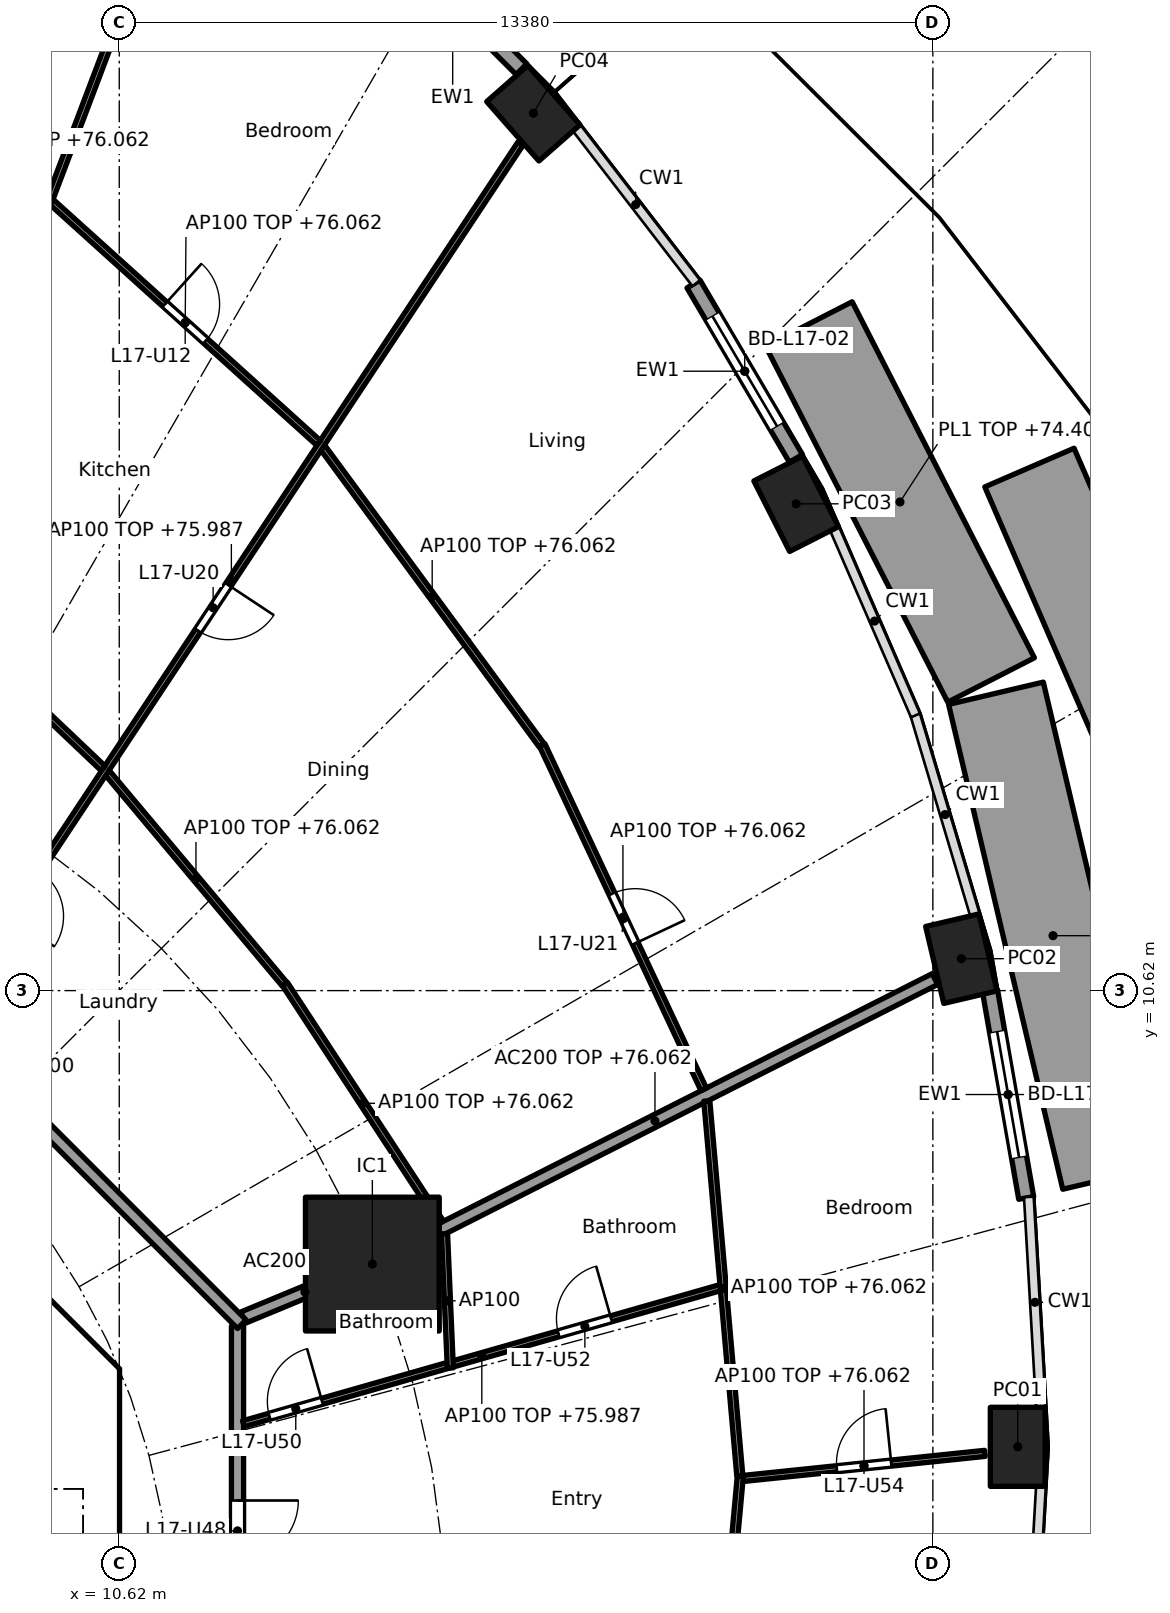
"""IFC4 building model, lengths in metres.
Left out: names, types, materials, properties, quantities, classifications, styles, units other than length and angle.
Written with IfcOpenShell. Run it as: python <this file> out.ifc"""

import sys

from ifc_helpers import new_model, si_unit, direction, frame, frame_2d, origin, origin_2d, place, context, subcontext, project, spatial, polyline, rectangle, hollow_rectangle, outline, extrude, element, fill, save


model = new_model("IFC4")
c1 = context("Model", 3, precision=1e-05, world=origin(), true_north=direction((0.0, 1.0)))
c2 = subcontext(c1, "Body", "Model", "MODEL_VIEW")
j1 = project(units=[si_unit("LENGTHUNIT", "METRE"), si_unit("PLANEANGLEUNIT", "RADIAN")], contexts=[c1])
p1 = place(None, origin())
s1 = spatial("IfcSite", under=j1, at=p1, CompositionType="ELEMENT")
p2 = place(p1, origin())
s2 = spatial("IfcBuilding", under=s1, at=p2, CompositionType="ELEMENT")
p3 = place(p2, frame((0.0, 0.0, 73.3)))
s3 = spatial("IfcBuildingStorey", under=s2, at=p3, CompositionType="ELEMENT", Elevation=73.3)
for number, where, z_axis, x_axis in (
    (1, (25.395, 3.118, -0.26), (0.0, 0.0, 1.0), (0.0, 1.0, 0.0)),
    (2, (24.468, 11.145, -0.26), (0.0, 0.0, 1.0), (-0.229, 0.973, 0.0)),
    (3, (21.751, 18.625, -0.26), (0.0, 0.0, 1.0), (-0.452, 0.892, 0.0)),
    (4, (17.43, 25.049, -0.26), (0.0, 0.0, 1.0), (-0.66, 0.751, 0.0)),
):
    element("IfcColumn", number, at=place(p3, frame(where, z_axis=z_axis, x_axis=x_axis)), inside=s3, PredefinedType="COLUMN", context=c2, shape_type="SweptSolid", body=[
        extrude(hollow_rectangle(XDim=1.3, YDim=0.9, WallThickness=0.045, at=origin_2d()), origin(), (0.0, 0.0, 1.0), 3.96),
    ])
p4 = place(p3, frame((14.782, 6.123, 0.0), z_axis=(0.0, 0.0, 1.0), x_axis=(1.0, 0.0, 0.0)))
e5 = element("IfcColumn", 5, at=p4, inside=s3, PredefinedType="COLUMN", context=c2, shape_type="SweptSolid", body=[
    extrude(rectangle(XDim=2.2, YDim=2.2, at=origin_2d()), origin(), (0.0, 0.0, 1.0), 3.7),
])
p5 = place(p3, frame((24.94, 10.613, 0.0), z_axis=(0.0, 0.0, 1.0), x_axis=(0.172164316671, -0.985068245385, 0.0)))
e6 = element("IfcWall", 6, at=p5, inside=s3, PredefinedType="SOLIDWALL", context=c2, shape_type="SweptSolid", body=[
    extrude(rectangle(XDim=3.454, YDim=0.25, at=frame_2d((1.727, 0.0))), origin(), (0.0, 0.0, 1.0), 3.44),
])
p6 = place(p5, frame((0.677, 0.0, 0.0)))
e7 = element("IfcOpeningElement", 7, at=p6, cuts=e6, PredefinedType="OPENING", context=c2, shape_type="SweptSolid", body=[
    extrude(rectangle(XDim=2.1, YDim=2.4, at=frame_2d((1.05, 1.2))), frame((0.0, 0.135, 0.0), z_axis=(0.0, -1.0, 0.0), x_axis=(1.0, 0.0, 0.0)), (0.0, 0.0, 1.0), 0.27),
])
p7 = place(p3, frame((20.064, 22.24, 0.0), z_axis=(0.0, 0.0, 1.0), x_axis=(0.506297921217, -0.862358634775, 0.0)))
e8 = element("IfcWall", 8, at=p7, inside=s3, PredefinedType="SOLIDWALL", context=c2, shape_type="SweptSolid", body=[
    extrude(rectangle(XDim=3.325, YDim=0.25, at=frame_2d((1.662, 0.0))), origin(), (0.0, 0.0, 1.0), 3.44),
])
p8 = place(p7, frame((0.612, 0.0, 0.0)))
e9 = element("IfcOpeningElement", 9, at=p8, cuts=e8, PredefinedType="OPENING", context=c2, shape_type="SweptSolid", body=[
    extrude(rectangle(XDim=2.1, YDim=2.4, at=frame_2d((1.05, 1.2))), frame((0.0, 0.135, 0.0), z_axis=(0.0, -1.0, 0.0), x_axis=(1.0, 0.0, 0.0)), (0.0, 0.0, 1.0), 0.27),
])
p9 = place(p3, frame((14.971, 28.032, 0.0), z_axis=(0.0, 0.0, 1.0), x_axis=(0.707793551437, -0.706419343269, 0.0)))
e10 = element("IfcWall", 10, at=p9, inside=s3, PredefinedType="SOLIDWALL", context=c2, shape_type="SweptSolid", body=[
    extrude(rectangle(XDim=3.198, YDim=0.25, at=frame_2d((1.599, 0.0))), origin(), (0.0, 0.0, 1.0), 3.44),
])
p10 = place(p9, frame((0.549, 0.0, 0.0)))
e11 = element("IfcOpeningElement", 11, at=p10, cuts=e10, PredefinedType="OPENING", context=c2, shape_type="SweptSolid", body=[
    extrude(rectangle(XDim=2.1, YDim=2.4, at=frame_2d((1.05, 1.2))), frame((0.0, 0.135, 0.0), z_axis=(0.0, -1.0, 0.0), x_axis=(1.0, 0.0, 0.0)), (0.0, 0.0, 1.0), 0.27),
])
p11 = place(p3, frame((24.957, 15.728, 0.0), z_axis=(0.0, 0.0, 1.0), x_axis=(-0.45556816318, 0.890200903559, 0.0)))
e12 = element("IfcWall", 12, at=p11, inside=s3, PredefinedType="SOLIDWALL", context=c2, shape_type="SweptSolid", body=[
    extrude(rectangle(XDim=6.577, YDim=1.6, at=frame_2d((3.289, 0.0))), origin(), (0.0, 0.0, 1.0), 1.1),
])
p12 = place(p3, frame((25.588, 19.221, 0.0), z_axis=(0.0, 0.0, 1.0), x_axis=(0.397526330852, -0.917590767325, 0.0)))
e13 = element("IfcWall", 13, at=p12, inside=s3, PredefinedType="SOLIDWALL", context=c2, shape_type="SweptSolid", body=[
    extrude(rectangle(XDim=11.827, YDim=1.6, at=frame_2d((5.913, 0.0))), origin(), (0.0, 0.0, 1.0), 1.1),
])
p13 = place(p3, frame((26.915, 7.537, 0.0), z_axis=(0.0, 0.0, 1.0), x_axis=(-0.229208785171, 0.973377281839, 0.0)))
e14 = element("IfcWall", 14, at=p13, inside=s3, PredefinedType="SOLIDWALL", context=c2, shape_type="SweptSolid", body=[
    extrude(rectangle(XDim=8.191, YDim=1.6, at=frame_2d((4.095, 0.0))), origin(), (0.0, 0.0, 1.0), 1.1),
])
p14 = place(p3, frame((9.988, 4.613, 0.0), z_axis=(0.0, 0.0, 1.0), x_axis=(-0.707106781187, 0.707106781187, 0.0)))
e15 = element("IfcWall", 15, at=p14, inside=s3, PredefinedType="SHEAR", context=c2, shape_type="SweptSolid", body=[
    extrude(rectangle(XDim=7.602, YDim=0.6, at=frame_2d((3.801, 0.0))), origin(), (0.0, 0.0, 1.0), 3.44),
])
p15 = place(p14, frame((3.201, 0.0, 0.0)))
e16 = element("IfcOpeningElement", 16, at=p15, cuts=e15, PredefinedType="OPENING", context=c2, shape_type="SweptSolid", body=[
    extrude(rectangle(XDim=1.2, YDim=2.1, at=frame_2d((0.6, 1.05))), frame((0.0, 0.31, 0.0), z_axis=(0.0, -1.0, 0.0), x_axis=(1.0, 0.0, 0.0)), (0.0, 0.0, 1.0), 0.62),
])
p16 = place(p3, frame((6.7, 4.0, 0.0), z_axis=(0.0, 0.0, 1.0), x_axis=(1.0, 0.0, 0.0)))
e17 = element("IfcWall", 17, at=p16, inside=s3, PredefinedType="SOLIDWALL", context=c2, shape_type="SweptSolid", body=[
    extrude(rectangle(XDim=3.325, YDim=0.2, at=frame_2d((1.662, 0.0))), origin(), (0.0, 0.0, 1.0), 3.44),
])
p17 = place(p16, frame((1.25, 0.0, 0.0)))
e18 = element("IfcOpeningElement", 18, at=p17, cuts=e17, PredefinedType="OPENING", context=c2, shape_type="SweptSolid", body=[
    extrude(rectangle(XDim=1.1, YDim=2.1, at=frame_2d((0.55, 1.05))), frame((0.0, 0.11, 0.0), z_axis=(0.0, -1.0, 0.0), x_axis=(1.0, 0.0, 0.0)), (0.0, 0.0, 1.0), 0.22),
])
p18 = place(p3, origin())
e19 = element("IfcWall", 19, at=p18, inside=s3, PredefinedType="SHEAR", context=c2, shape_type="SweptSolid", body=[
    extrude(outline(polyline([(9.776, -4.401), (10.025, -4.152), (10.025, -3.801), (10.025, 4.152), (9.776, 4.401), (10.2, 4.825), (10.625, 4.401), (10.625, -4.401), (10.2, -4.825), (9.776, -4.401)])), origin(), (0.0, 0.0, 1.0), 3.44),
])
p19 = place(p3, frame((12.657, 5.243, 0.0), z_axis=(0.0, 0.0, 1.0), x_axis=(0.923876145736, 0.382691608661, 0.0)))
e20 = element("IfcWall", 20, at=p19, inside=s3, PredefinedType="PARTITIONING", context=c2, shape_type="SweptSolid", body=[
    extrude(rectangle(XDim=2.2, YDim=0.2, at=frame_2d((1.1, 0.0))), origin(), (0.0, 0.0, 1.0), 3.44),
])
p20 = place(p3, frame((14.827, 6.146, 0.0), z_axis=(0.0, 0.0, 1.0), x_axis=(0.892068075337, 0.451901038906, 0.0)))
e21 = element("IfcWall", 21, at=p20, inside=s3, PredefinedType="PARTITIONING", context=c2, shape_type="SweptSolid", body=[
    extrude(rectangle(XDim=10.32, YDim=0.2, at=frame_2d((5.16, 0.0))), origin(), (0.0, 0.0, 1.0), 2.762),
])
p21 = place(p3, frame((12.565, -5.104, 0.0), z_axis=(0.0, 0.0, 1.0), x_axis=(0.0, 1.0, 0.0)))
e22 = element("IfcWall", 22, at=p21, inside=s3, PredefinedType="PARTITIONING", context=c2, shape_type="SweptSolid", body=[
    extrude(rectangle(XDim=10.209, YDim=0.2, at=frame_2d((5.104, 0.0))), origin(), (0.0, 0.0, 1.0), 3.44),
])
p22 = place(p21, frame((6.339, 0.0, 0.0)))
e23 = element("IfcOpeningElement", 23, at=p22, cuts=e22, PredefinedType="OPENING", context=c2, shape_type="SweptSolid", body=[
    extrude(rectangle(XDim=1.0, YDim=2.1, at=frame_2d((0.5, 1.05))), frame((0.0, 0.11, 0.0), z_axis=(0.0, -1.0, 0.0), x_axis=(1.0, 0.0, 0.0)), (0.0, 0.0, 1.0), 0.22),
])
p23 = place(p3, frame((12.635, 5.134, 0.0), z_axis=(0.0, 0.0, 1.0), x_axis=(-0.707106781187, 0.707106781187, 0.0)))
e24 = element("IfcWall", 24, at=p23, inside=s3, PredefinedType="PARTITIONING", context=c2, shape_type="SweptSolid", body=[
    extrude(rectangle(XDim=10.609, YDim=0.2, at=frame_2d((5.305, 0.0))), origin(), (0.0, 0.0, 1.0), 3.44),
])
p24 = place(p3, frame((20.879, 2.597, 0.0), z_axis=(0.0, 0.0, 1.0), x_axis=(0.994666546694, 0.103142914868, 0.0)))
e25 = element("IfcWall", 25, at=p24, inside=s3, PredefinedType="PARTITIONING", context=c2, shape_type="SweptSolid", body=[
    extrude(rectangle(XDim=3.998, YDim=0.1, at=frame_2d((1.999, 0.0))), origin(), (0.0, 0.0, 1.0), 2.762),
])
p25 = place(p24, frame((1.549, 0.0, 0.0)))
e26 = element("IfcOpeningElement", 26, at=p25, cuts=e25, PredefinedType="OPENING", context=c2, shape_type="SweptSolid", body=[
    extrude(rectangle(XDim=0.9, YDim=2.1, at=frame_2d((0.45, 1.05))), frame((0.0, 0.06, 0.0), z_axis=(0.0, -1.0, 0.0), x_axis=(1.0, 0.0, 0.0)), (0.0, 0.0, 1.0), 0.12),
])
p26 = place(p3, frame((20.825, 2.642, 0.0), z_axis=(0.0, 0.0, 1.0), x_axis=(-0.087760219522, 0.996141628419, 0.0)))
e27 = element("IfcWall", 27, at=p26, inside=s3, PredefinedType="PARTITIONING", context=c2, shape_type="SweptSolid", body=[
    extrude(rectangle(XDim=6.187, YDim=0.1, at=frame_2d((3.094, 0.0))), origin(), (0.0, 0.0, 1.0), 2.762),
])
p27 = place(p3, frame((20.834, 2.642, 0.0), z_axis=(0.0, 0.0, 1.0), x_axis=(-0.091385407685, -0.995815599025, 0.0)))
e28 = element("IfcWall", 28, at=p27, inside=s3, PredefinedType="PARTITIONING", context=c2, shape_type="SweptSolid", body=[
    extrude(rectangle(XDim=6.502, YDim=0.1, at=frame_2d((3.251, 0.0))), origin(), (0.0, 0.0, 1.0), 2.762),
])
p28 = place(p27, frame((1.201, 0.0, 0.0)))
e29 = element("IfcOpeningElement", 29, at=p28, cuts=e28, PredefinedType="OPENING", context=c2, shape_type="SweptSolid", body=[
    extrude(rectangle(XDim=0.9, YDim=2.1, at=frame_2d((0.45, 1.05))), frame((0.0, 0.06, 0.0), z_axis=(0.0, -1.0, 0.0), x_axis=(1.0, 0.0, 0.0)), (0.0, 0.0, 1.0), 0.12),
])
p29 = place(p3, frame((12.661, 3.497, 0.0), z_axis=(0.0, 0.0, 1.0), x_axis=(0.961626678623, 0.274361314621, 0.0)))
e30 = element("IfcWall", 30, at=p29, inside=s3, PredefinedType="PARTITIONING", context=c2, shape_type="SweptSolid", body=[
    extrude(rectangle(XDim=8.156, YDim=0.1, at=frame_2d((4.078, 0.0))), origin(), (0.0, 0.0, 1.0), 2.687),
])
p30 = place(p29, frame((0.446, 0.0, 0.0)))
e31 = element("IfcOpeningElement", 31, at=p30, cuts=e30, PredefinedType="OPENING", context=c2, shape_type="SweptSolid", body=[
    extrude(rectangle(XDim=0.9, YDim=2.1, at=frame_2d((0.45, 1.05))), frame((0.0, 0.06, 0.0), z_axis=(0.0, -1.0, 0.0), x_axis=(1.0, 0.0, 0.0)), (0.0, 0.0, 1.0), 0.12),
])
p31 = place(p29, frame((5.39, 0.0, 0.0)))
e32 = element("IfcOpeningElement", 32, at=p31, cuts=e30, PredefinedType="OPENING", context=c2, shape_type="SweptSolid", body=[
    extrude(rectangle(XDim=0.9, YDim=2.1, at=frame_2d((0.45, 1.05))), frame((0.0, 0.06, 0.0), z_axis=(0.0, -1.0, 0.0), x_axis=(1.0, 0.0, 0.0)), (0.0, 0.0, 1.0), 0.12),
])
p32 = place(p3, frame((16.064, 4.415, 0.0), z_axis=(0.0, 0.0, 1.0), x_axis=(-0.043101501373, 0.999070698489, 0.0)))
e33 = element("IfcWall", 33, at=p32, inside=s3, PredefinedType="PARTITIONING", context=c2, shape_type="SweptSolid", body=[
    extrude(rectangle(XDim=2.209, YDim=0.1, at=frame_2d((1.104, 0.0))), origin(), (0.0, 0.0, 1.0), 3.44),
])
p33 = place(p3, frame((15.91, 6.806, 0.0), z_axis=(0.0, 0.0, 1.0), x_axis=(-0.547468243486, 0.836826458936, 0.0)))
e34 = element("IfcWall", 34, at=p33, inside=s3, PredefinedType="PARTITIONING", context=c2, shape_type="SweptSolid", body=[
    extrude(rectangle(XDim=4.688, YDim=0.1, at=frame_2d((2.344, 0.0))), origin(), (0.0, 0.0, 1.0), 2.762),
])
p34 = place(p3, frame((20.231, 8.995, 0.0), z_axis=(0.0, 0.0, 1.0), x_axis=(-0.424587886407, 0.905386727712, 0.0)))
e35 = element("IfcWall", 35, at=p34, inside=s3, PredefinedType="PARTITIONING", context=c2, shape_type="SweptSolid", body=[
    extrude(rectangle(XDim=6.254, YDim=0.1, at=frame_2d((3.127, 0.0))), origin(), (0.0, 0.0, 1.0), 2.762),
])
p35 = place(p34, frame((2.652, 0.0, 0.0)))
e36 = element("IfcOpeningElement", 36, at=p35, cuts=e35, PredefinedType="OPENING", context=c2, shape_type="SweptSolid", body=[
    extrude(rectangle(XDim=0.9, YDim=2.1, at=frame_2d((0.45, 1.05))), frame((0.0, 0.06, 0.0), z_axis=(0.0, -1.0, 0.0), x_axis=(1.0, 0.0, 0.0)), (0.0, 0.0, 1.0), 0.12),
])
p36 = place(p3, frame((13.339, 10.725, 0.0), z_axis=(0.0, 0.0, 1.0), x_axis=(-0.642515455924, 0.766272724882, 0.0)))
e37 = element("IfcWall", 37, at=p36, inside=s3, PredefinedType="PARTITIONING", context=c2, shape_type="SweptSolid", body=[
    extrude(rectangle(XDim=4.537, YDim=0.1, at=frame_2d((2.269, 0.0))), origin(), (0.0, 0.0, 1.0), 2.762),
])
p37 = place(p3, frame((17.567, 14.653, 0.0), z_axis=(0.0, 0.0, 1.0), x_axis=(-0.592391983588, 0.80564988536, 0.0)))
e38 = element("IfcWall", 38, at=p37, inside=s3, PredefinedType="PARTITIONING", context=c2, shape_type="SweptSolid", body=[
    extrude(rectangle(XDim=6.08, YDim=0.1, at=frame_2d((3.04, 0.0))), origin(), (0.0, 0.0, 1.0), 2.762),
])
p38 = place(p3, frame((7.713, 10.195, 0.0), z_axis=(0.0, 0.0, 1.0), x_axis=(0.552111071171, 0.833770571015, 0.0)))
e39 = element("IfcWall", 39, at=p38, inside=s3, PredefinedType="PARTITIONING", context=c2, shape_type="SweptSolid", body=[
    extrude(rectangle(XDim=17.208, YDim=0.1, at=frame_2d((8.604, 0.0))), origin(), (0.0, 0.0, 1.0), 2.687),
])
p39 = place(p38, frame((1.976, 0.0, 0.0)))
e40 = element("IfcOpeningElement", 40, at=p39, cuts=e39, PredefinedType="OPENING", context=c2, shape_type="SweptSolid", body=[
    extrude(rectangle(XDim=0.9, YDim=2.1, at=frame_2d((0.45, 1.05))), frame((0.0, 0.06, 0.0), z_axis=(0.0, -1.0, 0.0), x_axis=(1.0, 0.0, 0.0)), (0.0, 0.0, 1.0), 0.12),
])
p40 = place(p38, frame((7.611, 0.0, 0.0)))
e41 = element("IfcOpeningElement", 41, at=p40, cuts=e39, PredefinedType="OPENING", context=c2, shape_type="SweptSolid", body=[
    extrude(rectangle(XDim=0.9, YDim=2.1, at=frame_2d((0.45, 1.05))), frame((0.0, 0.06, 0.0), z_axis=(0.0, -1.0, 0.0), x_axis=(1.0, 0.0, 0.0)), (0.0, 0.0, 1.0), 0.12),
])
p41 = place(p3, frame((10.355, 14.274, 0.0), z_axis=(0.0, 0.0, 1.0), x_axis=(-0.725219204328, 0.688518050361, 0.0)))
e42 = element("IfcWall", 42, at=p41, inside=s3, PredefinedType="PARTITIONING", context=c2, shape_type="SweptSolid", body=[
    extrude(rectangle(XDim=4.437, YDim=0.1, at=frame_2d((2.219, 0.0))), origin(), (0.0, 0.0, 1.0), 2.762),
])
p42 = place(p3, frame((13.898, 19.625, 0.0), z_axis=(0.0, 0.0, 1.0), x_axis=(-0.742400132046, 0.669956747812, 0.0)))
e43 = element("IfcWall", 43, at=p42, inside=s3, PredefinedType="PARTITIONING", context=c2, shape_type="SweptSolid", body=[
    extrude(rectangle(XDim=5.911, YDim=0.1, at=frame_2d((2.956, 0.0))), origin(), (0.0, 0.0, 1.0), 2.762),
])
p43 = place(p42, frame((2.506, 0.0, 0.0)))
e44 = element("IfcOpeningElement", 44, at=p43, cuts=e43, PredefinedType="OPENING", context=c2, shape_type="SweptSolid", body=[
    extrude(rectangle(XDim=0.9, YDim=2.1, at=frame_2d((0.45, 1.05))), frame((0.0, 0.06, 0.0), z_axis=(0.0, -1.0, 0.0), x_axis=(1.0, 0.0, 0.0)), (0.0, 0.0, 1.0), 0.12),
])
p44 = place(p3, frame((6.141, 14.829, 0.0), z_axis=(0.0, 0.0, 1.0), x_axis=(0.354477134193, 0.935064682968, 0.0)))
e45 = element("IfcWall", 45, at=p44, inside=s3, PredefinedType="PARTITIONING", context=c2, shape_type="SweptSolid", body=[
    extrude(rectangle(XDim=15.626, YDim=0.1, at=frame_2d((7.813, 0.0))), origin(), (0.0, 0.0, 1.0), 2.762),
])
p45 = place(p44, frame((1.35, 0.0, 0.0)))
e46 = element("IfcOpeningElement", 46, at=p45, cuts=e45, PredefinedType="OPENING", context=c2, shape_type="SweptSolid", body=[
    extrude(rectangle(XDim=0.9, YDim=2.1, at=frame_2d((0.45, 1.05))), frame((0.0, 0.06, 0.0), z_axis=(0.0, -1.0, 0.0), x_axis=(1.0, 0.0, 0.0)), (0.0, 0.0, 1.0), 0.12),
])
p46 = place(p44, frame((5.606, 0.0, 0.0)))
e47 = element("IfcOpeningElement", 47, at=p46, cuts=e45, PredefinedType="OPENING", context=c2, shape_type="SweptSolid", body=[
    extrude(rectangle(XDim=0.9, YDim=2.1, at=frame_2d((0.45, 1.05))), frame((0.0, 0.06, 0.0), z_axis=(0.0, -1.0, 0.0), x_axis=(1.0, 0.0, 0.0)), (0.0, 0.0, 1.0), 0.12),
])
p47 = place(p6, origin())
e48 = element("IfcDoor", 48, at=p47, inside=s3, OperationType="SLIDING_TO_LEFT", PredefinedType="DOOR", context=c2, shape_type="SweptSolid", body=[
    extrude(rectangle(XDim=2.1, YDim=2.4, at=frame_2d((1.05, 1.2))), frame((0.0, 0.025, 0.0), z_axis=(0.0, -1.0, 0.0), x_axis=(1.0, 0.0, 0.0)), (0.0, 0.0, 1.0), 0.05),
])
fill(e7, e48)
p48 = place(p8, origin())
e49 = element("IfcDoor", 49, at=p48, inside=s3, OperationType="SLIDING_TO_LEFT", PredefinedType="DOOR", context=c2, shape_type="SweptSolid", body=[
    extrude(rectangle(XDim=2.1, YDim=2.4, at=frame_2d((1.05, 1.2))), frame((0.0, 0.025, 0.0), z_axis=(0.0, -1.0, 0.0), x_axis=(1.0, 0.0, 0.0)), (0.0, 0.0, 1.0), 0.05),
])
fill(e9, e49)
p49 = place(p43, frame((0.9, 0.0, 0.0), x_axis=(-1.0, 0.0, 0.0)))
e50 = element("IfcDoor", 50, at=p49, inside=s3, OperationType="SINGLE_SWING_LEFT", PredefinedType="DOOR", context=c2, shape_type="SweptSolid", body=[
    extrude(rectangle(XDim=0.9, YDim=2.1, at=frame_2d((0.45, 1.05))), frame((0.0, 0.025, 0.0), z_axis=(0.0, -1.0, 0.0), x_axis=(1.0, 0.0, 0.0)), (0.0, 0.0, 1.0), 0.05),
])
fill(e44, e50)
p50 = place(p40, frame((0.9, 0.0, 0.0), x_axis=(-1.0, 0.0, 0.0)))
e51 = element("IfcDoor", 51, at=p50, inside=s3, OperationType="SINGLE_SWING_LEFT", PredefinedType="DOOR", context=c2, shape_type="SweptSolid", body=[
    extrude(rectangle(XDim=0.9, YDim=2.1, at=frame_2d((0.45, 1.05))), frame((0.0, 0.025, 0.0), z_axis=(0.0, -1.0, 0.0), x_axis=(1.0, 0.0, 0.0)), (0.0, 0.0, 1.0), 0.05),
])
fill(e41, e51)
p51 = place(p35, frame((0.9, 0.0, 0.0), x_axis=(-1.0, 0.0, 0.0)))
e52 = element("IfcDoor", 52, at=p51, inside=s3, OperationType="SINGLE_SWING_RIGHT", PredefinedType="DOOR", context=c2, shape_type="SweptSolid", body=[
    extrude(rectangle(XDim=0.9, YDim=2.1, at=frame_2d((0.45, 1.05))), frame((0.0, 0.025, 0.0), z_axis=(0.0, -1.0, 0.0), x_axis=(1.0, 0.0, 0.0)), (0.0, 0.0, 1.0), 0.05),
])
fill(e36, e52)
p52 = place(p22, frame((1.0, 0.0, 0.0), x_axis=(-1.0, 0.0, 0.0)))
e53 = element("IfcDoor", 53, at=p52, inside=s3, OperationType="SINGLE_SWING_LEFT", PredefinedType="DOOR", context=c2, shape_type="SweptSolid", body=[
    extrude(rectangle(XDim=1.0, YDim=2.1, at=frame_2d((0.5, 1.05))), frame((0.0, 0.025, 0.0), z_axis=(0.0, -1.0, 0.0), x_axis=(1.0, 0.0, 0.0)), (0.0, 0.0, 1.0), 0.05),
])
fill(e23, e53)
p53 = place(p30, origin())
e54 = element("IfcDoor", 54, at=p53, inside=s3, OperationType="SINGLE_SWING_RIGHT", PredefinedType="DOOR", context=c2, shape_type="SweptSolid", body=[
    extrude(rectangle(XDim=0.9, YDim=2.1, at=frame_2d((0.45, 1.05))), frame((0.0, 0.025, 0.0), z_axis=(0.0, -1.0, 0.0), x_axis=(1.0, 0.0, 0.0)), (0.0, 0.0, 1.0), 0.05),
])
fill(e31, e54)
p54 = place(p31, origin())
e55 = element("IfcDoor", 55, at=p54, inside=s3, OperationType="SINGLE_SWING_RIGHT", PredefinedType="DOOR", context=c2, shape_type="SweptSolid", body=[
    extrude(rectangle(XDim=0.9, YDim=2.1, at=frame_2d((0.45, 1.05))), frame((0.0, 0.025, 0.0), z_axis=(0.0, -1.0, 0.0), x_axis=(1.0, 0.0, 0.0)), (0.0, 0.0, 1.0), 0.05),
])
fill(e32, e55)
p55 = place(p25, origin())
e56 = element("IfcDoor", 56, at=p55, inside=s3, OperationType="SINGLE_SWING_RIGHT", PredefinedType="DOOR", context=c2, shape_type="SweptSolid", body=[
    extrude(rectangle(XDim=0.9, YDim=2.1, at=frame_2d((0.45, 1.05))), frame((0.0, 0.025, 0.0), z_axis=(0.0, -1.0, 0.0), x_axis=(1.0, 0.0, 0.0)), (0.0, 0.0, 1.0), 0.05),
])
fill(e26, e56)
save(model, sys.argv[1])
